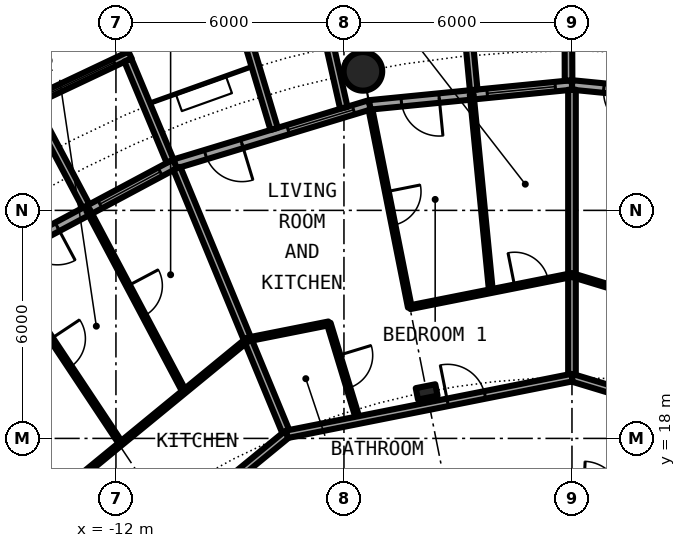
"""IFC4 building model, lengths in metres.
Left out: names, types, materials, properties, quantities, classifications, styles, units other than length and angle.
Written with IfcOpenShell. Run it as: python <this file> out.ifc"""

import sys

from ifc_helpers import new_model, si_unit, direction, frame, frame_2d, origin, origin_2d, place, context, subcontext, project, spatial, rectangle, circle, hollow_circle, i_section, extrude, element, fill, save


model = new_model("IFC4")
c1 = context("Model", 3, precision=1e-05, world=origin(), true_north=direction((0.0, 1.0)))
c2 = subcontext(c1, "Body", "Model", "MODEL_VIEW")
j1 = project(units=[si_unit("LENGTHUNIT", "METRE"), si_unit("PLANEANGLEUNIT", "RADIAN")], contexts=[c1])
p1 = place(None, origin())
s1 = spatial("IfcSite", under=j1, at=p1, CompositionType="ELEMENT")
p2 = place(p1, origin())
s2 = spatial("IfcBuilding", under=s1, at=p2, CompositionType="ELEMENT")
p3 = place(p2, frame((0.0, 0.0, 91.05)))
s3 = spatial("IfcBuildingStorey", under=s2, at=p3, CompositionType="ELEMENT", Elevation=91.05)
p4 = place(p3, frame((-5.501, 27.658, 0.0), z_axis=(0.0, 0.0, 1.0), x_axis=(1.0, 0.0, 0.0)))
e1 = element("IfcColumn", 1, at=p4, inside=s3, PredefinedType="COLUMN", context=c2, shape_type="SweptSolid", body=[
    extrude(hollow_circle(Radius=0.508, WallThickness=0.04, at=origin_2d()), origin(), (0.0, 0.0, 1.0), 3.05),
])
p5 = place(p3, frame((-3.824, 19.223, 0.0), z_axis=(0.0, 0.0, 1.0), x_axis=(-0.195090322016, 0.980785280403, 0.0)))
e2 = element("IfcColumn", 2, at=p5, inside=s3, PredefinedType="COLUMN", context=c2, shape_type="SweptSolid", body=[
    extrude(i_section(OverallWidth=0.306, OverallDepth=0.524, WebThickness=0.021, FlangeThickness=0.04, FilletRadius=0.027, at=origin_2d()), origin(), (0.0, 0.0, 1.0), 3.05),
])
p6 = place(p3, frame((5.326, 26.775, 0.0), z_axis=(0.0, 0.0, 1.0), x_axis=(-0.995173996315, 0.098126026407, 0.0)))
e3 = element("IfcWall", 3, at=p6, inside=s3, PredefinedType="SOLIDWALL", context=c2, shape_type="SweptSolid", body=[
    extrude(rectangle(XDim=5.352, YDim=0.25, at=frame_2d((2.676, 0.0))), origin(), (0.0, 0.0, 1.0), 2.7),
])
p7 = place(p6, frame((0.441, 0.0, 0.3)))
e4 = element("IfcOpeningElement", 4, at=p7, cuts=e3, PredefinedType="OPENING", context=c2, shape_type="SweptSolid", body=[
    extrude(rectangle(XDim=1.8, YDim=2.1, at=frame_2d((0.9, 1.05))), frame((0.0, 0.135, 0.0), z_axis=(0.0, -1.0, 0.0), x_axis=(1.0, 0.0, 0.0)), (0.0, 0.0, 1.0), 0.27),
])
p8 = place(p6, frame((3.51, 0.0, 0.0)))
e5 = element("IfcOpeningElement", 5, at=p8, cuts=e3, PredefinedType="OPENING", context=c2, shape_type="SweptSolid", body=[
    extrude(rectangle(XDim=1.0, YDim=2.2, at=frame_2d((0.5, 1.1))), frame((0.0, 0.135, 0.0), z_axis=(0.0, -1.0, 0.0), x_axis=(1.0, 0.0, 0.0)), (0.0, 0.0, 1.0), 0.27),
])
p9 = place(p3, frame((0.0, 27.3, 0.0), z_axis=(0.0, 0.0, 1.0), x_axis=(-0.995173996315, -0.098126026407, 0.0)))
e6 = element("IfcWall", 6, at=p9, inside=s3, PredefinedType="SOLIDWALL", context=c2, shape_type="SweptSolid", body=[
    extrude(rectangle(XDim=5.352, YDim=0.25, at=frame_2d((2.676, 0.0))), origin(), (0.0, 0.0, 1.0), 2.7),
])
p10 = place(p9, frame((0.441, 0.0, 0.3)))
e7 = element("IfcOpeningElement", 7, at=p10, cuts=e6, PredefinedType="OPENING", context=c2, shape_type="SweptSolid", body=[
    extrude(rectangle(XDim=1.8, YDim=2.1, at=frame_2d((0.9, 1.05))), frame((0.0, 0.135, 0.0), z_axis=(0.0, -1.0, 0.0), x_axis=(1.0, 0.0, 0.0)), (0.0, 0.0, 1.0), 0.27),
])
p11 = place(p9, frame((3.51, 0.0, 0.0)))
e8 = element("IfcOpeningElement", 8, at=p11, cuts=e6, PredefinedType="OPENING", context=c2, shape_type="SweptSolid", body=[
    extrude(rectangle(XDim=1.0, YDim=2.2, at=frame_2d((0.5, 1.1))), frame((0.0, 0.135, 0.0), z_axis=(0.0, -1.0, 0.0), x_axis=(1.0, 0.0, 0.0)), (0.0, 0.0, 1.0), 0.27),
])
p12 = place(p3, frame((-0.09, 27.417, -0.03), z_axis=(0.0, 0.0, 1.0), x_axis=(-0.00347308367, 0.999993968827, 0.0)))
e9 = element("IfcWall", 9, at=p12, inside=s3, PredefinedType="SOLIDWALL", context=c2, shape_type="SweptSolid", body=[
    extrude(rectangle(XDim=2.882, YDim=0.2, at=frame_2d((1.441, 0.0))), origin(), (0.0, 0.0, 1.0), 2.73),
])
p13 = place(p3, frame((-2.586, 27.171, -0.03), z_axis=(0.0, 0.0, 1.0), x_axis=(-0.094548432284, 0.995520262954, 0.0)))
e10 = element("IfcWall", 10, at=p13, inside=s3, PredefinedType="SOLIDWALL", context=c2, shape_type="SweptSolid", body=[
    extrude(rectangle(XDim=3.006, YDim=0.2, at=frame_2d((1.503, 0.0))), origin(), (0.0, 0.0, 1.0), 2.73),
])
p14 = place(p3, frame((-5.326, 26.775, 0.0), z_axis=(0.0, 0.0, 1.0), x_axis=(-0.956965678721, -0.290201119486, 0.0)))
e11 = element("IfcWall", 11, at=p14, inside=s3, PredefinedType="SOLIDWALL", context=c2, shape_type="SweptSolid", body=[
    extrude(rectangle(XDim=5.351, YDim=0.25, at=frame_2d((2.676, 0.0))), origin(), (0.0, 0.0, 1.0), 2.7),
])
p15 = place(p14, frame((0.441, 0.0, 0.3)))
e12 = element("IfcOpeningElement", 12, at=p15, cuts=e11, PredefinedType="OPENING", context=c2, shape_type="SweptSolid", body=[
    extrude(rectangle(XDim=1.8, YDim=2.1, at=frame_2d((0.9, 1.05))), frame((0.0, 0.135, 0.0), z_axis=(0.0, -1.0, 0.0), x_axis=(1.0, 0.0, 0.0)), (0.0, 0.0, 1.0), 0.27),
])
p16 = place(p14, frame((3.51, 0.0, 0.0)))
e13 = element("IfcOpeningElement", 13, at=p16, cuts=e11, PredefinedType="OPENING", context=c2, shape_type="SweptSolid", body=[
    extrude(rectangle(XDim=1.0, YDim=2.2, at=frame_2d((0.5, 1.1))), frame((0.0, 0.135, 0.0), z_axis=(0.0, -1.0, 0.0), x_axis=(1.0, 0.0, 0.0)), (0.0, 0.0, 1.0), 0.27),
])
p17 = place(p3, frame((-6.004, 26.7, -0.03), z_axis=(0.0, 0.0, 1.0), x_axis=(-0.219609259383, 0.975587911566, 0.0)))
e14 = element("IfcWall", 14, at=p17, inside=s3, PredefinedType="SOLIDWALL", context=c2, shape_type="SweptSolid", body=[
    extrude(rectangle(XDim=2.933, YDim=0.2, at=frame_2d((1.466, 0.0))), origin(), (0.0, 0.0, 1.0), 2.73),
])
p18 = place(p3, frame((-7.837, 26.144, -0.03), z_axis=(0.0, 0.0, 1.0), x_axis=(-0.287064767992, 0.957911174889, 0.0)))
e15 = element("IfcWall", 15, at=p18, inside=s3, PredefinedType="SOLIDWALL", context=c2, shape_type="SweptSolid", body=[
    extrude(rectangle(XDim=3.006, YDim=0.2, at=frame_2d((1.503, 0.0))), origin(), (0.0, 0.0, 1.0), 2.73),
])
p19 = place(p3, frame((-10.447, 25.222, 0.0), z_axis=(0.0, 0.0, 1.0), x_axis=(-0.881915646801, -0.471407246368, 0.0)))
e16 = element("IfcWall", 16, at=p19, inside=s3, PredefinedType="SOLIDWALL", context=c2, shape_type="SweptSolid", body=[
    extrude(rectangle(XDim=5.352, YDim=0.25, at=frame_2d((2.676, 0.0))), origin(), (0.0, 0.0, 1.0), 2.7),
])
p20 = place(p19, frame((0.441, 0.0, 0.3)))
e17 = element("IfcOpeningElement", 17, at=p20, cuts=e16, PredefinedType="OPENING", context=c2, shape_type="SweptSolid", body=[
    extrude(rectangle(XDim=1.8, YDim=2.1, at=frame_2d((0.9, 1.05))), frame((0.0, 0.135, 0.0), z_axis=(0.0, -1.0, 0.0), x_axis=(1.0, 0.0, 0.0)), (0.0, 0.0, 1.0), 0.27),
])
p21 = place(p19, frame((3.51, 0.0, 0.0)))
e18 = element("IfcOpeningElement", 18, at=p21, cuts=e16, PredefinedType="OPENING", context=c2, shape_type="SweptSolid", body=[
    extrude(rectangle(XDim=1.0, YDim=2.2, at=frame_2d((0.5, 1.1))), frame((0.0, 0.135, 0.0), z_axis=(0.0, -1.0, 0.0), x_axis=(1.0, 0.0, 0.0)), (0.0, 0.0, 1.0), 0.27),
])
p22 = place(p3, frame((-11.629, 28.088, -0.03), z_axis=(0.0, 0.0, 1.0), x_axis=(-0.904000060331, -0.427532327342, 0.0)))
e19 = element("IfcWall", 19, at=p22, inside=s3, PredefinedType="SOLIDWALL", context=c2, shape_type="SweptSolid", body=[
    extrude(rectangle(XDim=2.993, YDim=0.2, at=frame_2d((1.497, 0.0))), origin(), (0.0, 0.0, 1.0), 2.73),
])
p23 = place(p22, frame((0.457, 0.0, 0.33)))
e20 = element("IfcOpeningElement", 20, at=p23, cuts=e19, PredefinedType="OPENING", context=c2, shape_type="SweptSolid", body=[
    extrude(circle(Radius=1.04, at=frame_2d((1.04, 1.04))), frame((0.0, 0.11, 0.0), z_axis=(0.0, -1.0, 0.0), x_axis=(1.0, 0.0, 0.0)), (0.0, 0.0, 1.0), 0.22),
])
p24 = place(p3, frame((-10.575, 25.295, -0.03), z_axis=(0.0, 0.0, 1.0), x_axis=(-0.385697364644, 0.922625353492, 0.0)))
e21 = element("IfcWall", 21, at=p24, inside=s3, PredefinedType="SOLIDWALL", context=c2, shape_type="SweptSolid", body=[
    extrude(rectangle(XDim=2.883, YDim=0.2, at=frame_2d((1.442, 0.0))), origin(), (0.0, 0.0, 1.0), 2.73),
])
p25 = place(p3, frame((-12.787, 24.113, -0.03), z_axis=(0.0, 0.0, 1.0), x_axis=(-0.468365282436, 0.883534924159, 0.0)))
e22 = element("IfcWall", 22, at=p25, inside=s3, PredefinedType="SOLIDWALL", context=c2, shape_type="SweptSolid", body=[
    extrude(rectangle(XDim=3.006, YDim=0.2, at=frame_2d((1.503, 0.0))), origin(), (0.0, 0.0, 1.0), 2.73),
])
p26 = place(p3, frame((-17.24, 21.007, 0.0), z_axis=(0.0, 0.0, 1.0), x_axis=(0.634396151441, -0.77300810024, 0.0)))
e23 = element("IfcWall", 23, at=p26, inside=s3, PredefinedType="PARTITIONING", context=c2, shape_type="SweptSolid", body=[
    extrude(rectangle(XDim=8.419, YDim=0.1, at=frame_2d((4.209, 0.0))), origin(), (0.0, 0.0, 1.0), 2.7),
])
p27 = place(p26, frame((6.679, 0.0, 0.0)))
e24 = element("IfcOpeningElement", 24, at=p27, cuts=e23, PredefinedType="OPENING", context=c2, shape_type="SweptSolid", body=[
    extrude(rectangle(XDim=0.9, YDim=2.3, at=frame_2d((0.45, 1.15))), frame((0.0, 0.06, 0.0), z_axis=(0.0, -1.0, 0.0), x_axis=(1.0, 0.0, 0.0)), (0.0, 0.0, 1.0), 0.12),
])
p28 = place(p26, frame((2.468, 0.0, 0.0)))
e25 = element("IfcOpeningElement", 25, at=p28, cuts=e23, PredefinedType="OPENING", context=c2, shape_type="SweptSolid", body=[
    extrude(rectangle(XDim=0.9, YDim=2.3, at=frame_2d((0.45, 1.15))), frame((0.0, 0.06, 0.0), z_axis=(0.0, -1.0, 0.0), x_axis=(1.0, 0.0, 0.0)), (0.0, 0.0, 1.0), 0.12),
])
p29 = place(p3, frame((-15.039, 22.634, 0.0), z_axis=(0.0, 0.0, 1.0), x_axis=(0.553440102418, -0.832888980018, 0.0)))
e26 = element("IfcWall", 26, at=p29, inside=s3, PredefinedType="PARTITIONING", context=c2, shape_type="SweptSolid", body=[
    extrude(rectangle(XDim=5.726, YDim=0.1, at=frame_2d((2.863, 0.0))), origin(), (0.0, 0.0, 1.0), 2.7),
])
p30 = place(p29, frame((2.413, 0.0, 0.0)))
e27 = element("IfcOpeningElement", 27, at=p30, cuts=e26, PredefinedType="OPENING", context=c2, shape_type="SweptSolid", body=[
    extrude(rectangle(XDim=0.9, YDim=2.3, at=frame_2d((0.45, 1.15))), frame((0.0, 0.06, 0.0), z_axis=(0.0, -1.0, 0.0), x_axis=(1.0, 0.0, 0.0)), (0.0, 0.0, 1.0), 0.12),
])
p31 = place(p3, frame((-12.734, 24.007, 0.0), z_axis=(0.0, 0.0, 1.0), x_axis=(0.468610030042, -0.883405139075, 0.0)))
e28 = element("IfcWall", 28, at=p31, inside=s3, PredefinedType="PARTITIONING", context=c2, shape_type="SweptSolid", body=[
    extrude(rectangle(XDim=5.403, YDim=0.1, at=frame_2d((2.702, 0.0))), origin(), (0.0, 0.0, 1.0), 2.7),
])
p32 = place(p31, frame((2.252, 0.0, 0.0)))
e29 = element("IfcOpeningElement", 29, at=p32, cuts=e28, PredefinedType="OPENING", context=c2, shape_type="SweptSolid", body=[
    extrude(rectangle(XDim=0.9, YDim=2.3, at=frame_2d((0.45, 1.15))), frame((0.0, 0.06, 0.0), z_axis=(0.0, -1.0, 0.0), x_axis=(1.0, 0.0, 0.0)), (0.0, 0.0, 1.0), 0.12),
])
p33 = place(p3, frame((-10.398, 25.106, 0.0), z_axis=(0.0, 0.0, 1.0), x_axis=(0.382490346157, -0.923959487801, 0.0)))
e30 = element("IfcWall", 30, at=p33, inside=s3, PredefinedType="PARTITIONING", context=c2, shape_type="SweptSolid", body=[
    extrude(rectangle(XDim=7.574, YDim=0.2, at=frame_2d((3.787, 0.0))), origin(), (0.0, 0.0, 1.0), 2.7),
])
p34 = place(p3, frame((-6.4, 21.027, 0.0), z_axis=(0.0, 0.0, 1.0), x_axis=(0.291157965538, -0.956674991365, 0.0)))
e31 = element("IfcWall", 31, at=p34, inside=s3, PredefinedType="PARTITIONING", context=c2, shape_type="SweptSolid", body=[
    extrude(rectangle(XDim=2.661, YDim=0.1, at=frame_2d((1.331, 0.0))), origin(), (0.0, 0.0, 1.0), 2.7),
])
p35 = place(p34, frame((0.881, 0.0, 0.0)))
e32 = element("IfcOpeningElement", 32, at=p35, cuts=e31, PredefinedType="OPENING", context=c2, shape_type="SweptSolid", body=[
    extrude(rectangle(XDim=0.9, YDim=2.3, at=frame_2d((0.45, 1.15))), frame((0.0, 0.06, 0.0), z_axis=(0.0, -1.0, 0.0), x_axis=(1.0, 0.0, 0.0)), (0.0, 0.0, 1.0), 0.12),
])
p36 = place(p3, frame((-5.302, 26.653, 0.0), z_axis=(0.0, 0.0, 1.0), x_axis=(0.195115793364, -0.980780213493, 0.0)))
e33 = element("IfcWall", 33, at=p36, inside=s3, PredefinedType="PARTITIONING", context=c2, shape_type="SweptSolid", body=[
    extrude(rectangle(XDim=5.304, YDim=0.1, at=frame_2d((2.652, 0.0))), origin(), (0.0, 0.0, 1.0), 2.7),
])
p37 = place(p36, frame((2.202, 0.0, 0.0)))
e34 = element("IfcOpeningElement", 34, at=p37, cuts=e33, PredefinedType="OPENING", context=c2, shape_type="SweptSolid", body=[
    extrude(rectangle(XDim=0.9, YDim=2.3, at=frame_2d((0.45, 1.15))), frame((0.0, 0.06, 0.0), z_axis=(0.0, -1.0, 0.0), x_axis=(1.0, 0.0, 0.0)), (0.0, 0.0, 1.0), 0.12),
])
p38 = place(p3, frame((-2.638, 27.047, 0.0), z_axis=(0.0, 0.0, 1.0), x_axis=(0.097172620677, -0.99526754282, 0.0)))
e35 = element("IfcWall", 35, at=p38, inside=s3, PredefinedType="PARTITIONING", context=c2, shape_type="SweptSolid", body=[
    extrude(rectangle(XDim=5.196, YDim=0.1, at=frame_2d((2.598, 0.0))), origin(), (0.0, 0.0, 1.0), 2.7),
])
p39 = place(p3, frame((0.0, 19.6, 0.0), z_axis=(0.0, 0.0, 1.0), x_axis=(0.0, 1.0, 0.0)))
e36 = element("IfcWall", 36, at=p39, inside=s3, PredefinedType="PARTITIONING", context=c2, shape_type="SweptSolid", body=[
    extrude(rectangle(XDim=7.575, YDim=0.2, at=frame_2d((3.788, 0.0))), origin(), (0.0, 0.0, 1.0), 2.7),
])
p40 = place(p3, frame((-0.007, 19.599, 0.0), z_axis=(0.0, 0.0, 1.0), x_axis=(0.95700958731, -0.290056287291, 0.0)))
e37 = element("IfcWall", 37, at=p40, inside=s3, PredefinedType="PARTITIONING", context=c2, shape_type="SweptSolid", body=[
    extrude(rectangle(XDim=11.226, YDim=0.2, at=frame_2d((5.613, 0.0))), origin(), (0.0, 0.0, 1.0), 2.38),
])
p41 = place(p40, frame((7.093, 0.0, 0.0)))
e38 = element("IfcOpeningElement", 38, at=p41, cuts=e37, PredefinedType="OPENING", context=c2, shape_type="SweptSolid", body=[
    extrude(rectangle(XDim=1.0, YDim=2.3, at=frame_2d((0.5, 1.15))), frame((0.0, 0.11, 0.0), z_axis=(0.0, -1.0, 0.0), x_axis=(1.0, 0.0, 0.0)), (0.0, 0.0, 1.0), 0.22),
])
p42 = place(p3, frame((-16.173, 10.991, 0.0), z_axis=(0.0, 0.0, 1.0), x_axis=(0.773049018445, 0.634346289562, 0.0)))
e39 = element("IfcWall", 39, at=p42, inside=s3, PredefinedType="PARTITIONING", context=c2, shape_type="SweptSolid", body=[
    extrude(rectangle(XDim=11.219, YDim=0.2, at=frame_2d((5.61, 0.0))), origin(), (0.0, 0.0, 1.0), 2.38),
])
p43 = place(p42, frame((3.135, 0.0, 0.0)))
e40 = element("IfcOpeningElement", 40, at=p43, cuts=e39, PredefinedType="OPENING", context=c2, shape_type="SweptSolid", body=[
    extrude(rectangle(XDim=1.0, YDim=2.3, at=frame_2d((0.5, 1.15))), frame((0.0, 0.11, 0.0), z_axis=(0.0, -1.0, 0.0), x_axis=(1.0, 0.0, 0.0)), (0.0, 0.0, 1.0), 0.22),
])
p44 = place(p3, frame((-7.501, 18.108, 0.0), z_axis=(0.0, 0.0, 1.0), x_axis=(0.980791233058, 0.195060393611, 0.0)))
e41 = element("IfcWall", 41, at=p44, inside=s3, PredefinedType="PARTITIONING", context=c2, shape_type="SweptSolid", body=[
    extrude(rectangle(XDim=7.65, YDim=0.2, at=frame_2d((3.825, 0.0))), origin(), (0.0, 0.0, 1.0), 2.38),
])
p45 = place(p44, frame((4.313, 0.0, 0.0)))
e42 = element("IfcOpeningElement", 42, at=p45, cuts=e41, PredefinedType="OPENING", context=c2, shape_type="SweptSolid", body=[
    extrude(rectangle(XDim=1.0, YDim=2.3, at=frame_2d((0.5, 1.15))), frame((0.0, 0.11, 0.0), z_axis=(0.0, -1.0, 0.0), x_axis=(1.0, 0.0, 0.0)), (0.0, 0.0, 1.0), 0.22),
])
p46 = place(p3, frame((-13.538, 16.496, 0.0), z_axis=(0.0, 0.0, 1.0), x_axis=(0.773000340237, 0.634405606843, 0.0)))
e43 = element("IfcWall", 43, at=p46, inside=s3, PredefinedType="PARTITIONING", context=c2, shape_type="SweptSolid", body=[
    extrude(rectangle(XDim=6.474, YDim=0.1, at=frame_2d((3.237, 0.0))), origin(), (0.0, 0.0, 1.0), 2.7),
])
p47 = place(p3, frame((-0.004, 22.299, 0.0), z_axis=(0.0, 0.0, 1.0), x_axis=(0.95699555343, -0.290102586537, 0.0)))
e44 = element("IfcWall", 44, at=p47, inside=s3, PredefinedType="PARTITIONING", context=c2, shape_type="SweptSolid", body=[
    extrude(rectangle(XDim=6.478, YDim=0.1, at=frame_2d((3.239, 0.0))), origin(), (0.0, 0.0, 1.0), 2.7),
])
p48 = place(p3, frame((-8.534, 20.603, 0.0), z_axis=(0.0, 0.0, 1.0), x_axis=(0.980821612706, 0.194907578226, 0.0)))
e45 = element("IfcWall", 45, at=p48, inside=s3, PredefinedType="PARTITIONING", context=c2, shape_type="SweptSolid", body=[
    extrude(rectangle(XDim=2.176, YDim=0.1, at=frame_2d((1.088, 0.0))), origin(), (0.0, 0.0, 1.0), 2.7),
])
p49 = place(p3, frame((-4.261, 21.452, 0.0), z_axis=(0.0, 0.0, 1.0), x_axis=(0.980819753929, 0.194916931799, 0.0)))
e46 = element("IfcWall", 46, at=p49, inside=s3, PredefinedType="PARTITIONING", context=c2, shape_type="SweptSolid", body=[
    extrude(rectangle(XDim=4.346, YDim=0.1, at=frame_2d((2.173, 0.0))), origin(), (0.0, 0.0, 1.0), 2.7),
])
p50 = place(p49, frame((2.807, 0.0, 0.0)))
e47 = element("IfcOpeningElement", 47, at=p50, cuts=e46, PredefinedType="OPENING", context=c2, shape_type="SweptSolid", body=[
    extrude(rectangle(XDim=0.9, YDim=2.3, at=frame_2d((0.45, 1.15))), frame((0.0, 0.06, 0.0), z_axis=(0.0, -1.0, 0.0), x_axis=(1.0, 0.0, 0.0)), (0.0, 0.0, 1.0), 0.12),
])
p51 = place(p8, origin())
e48 = element("IfcDoor", 48, at=p51, inside=s3, OperationType="SINGLE_SWING_LEFT", PredefinedType="DOOR", context=c2, shape_type="SweptSolid", body=[
    extrude(rectangle(XDim=1.0, YDim=2.2, at=frame_2d((0.5, 1.1))), frame((0.0, 0.025, 0.0), z_axis=(0.0, -1.0, 0.0), x_axis=(1.0, 0.0, 0.0)), (0.0, 0.0, 1.0), 0.05),
])
fill(e5, e48)
p52 = place(p10, origin())
e49 = element("IfcWindow", 49, at=p52, inside=s3, PartitioningType="SINGLE_PANEL", PredefinedType="WINDOW", context=c2, shape_type="SweptSolid", body=[
    extrude(rectangle(XDim=1.8, YDim=2.1, at=frame_2d((0.9, 1.05))), frame((0.0, 0.03, 0.0), z_axis=(0.0, -1.0, 0.0), x_axis=(1.0, 0.0, 0.0)), (0.0, 0.0, 1.0), 0.06),
])
fill(e7, e49)
p53 = place(p11, origin())
e50 = element("IfcDoor", 50, at=p53, inside=s3, OperationType="SINGLE_SWING_LEFT", PredefinedType="DOOR", context=c2, shape_type="SweptSolid", body=[
    extrude(rectangle(XDim=1.0, YDim=2.2, at=frame_2d((0.5, 1.1))), frame((0.0, 0.025, 0.0), z_axis=(0.0, -1.0, 0.0), x_axis=(1.0, 0.0, 0.0)), (0.0, 0.0, 1.0), 0.05),
])
fill(e8, e50)
p54 = place(p15, origin())
e51 = element("IfcWindow", 51, at=p54, inside=s3, PartitioningType="SINGLE_PANEL", PredefinedType="WINDOW", context=c2, shape_type="SweptSolid", body=[
    extrude(rectangle(XDim=1.8, YDim=2.1, at=frame_2d((0.9, 1.05))), frame((0.0, 0.03, 0.0), z_axis=(0.0, -1.0, 0.0), x_axis=(1.0, 0.0, 0.0)), (0.0, 0.0, 1.0), 0.06),
])
fill(e12, e51)
p55 = place(p16, origin())
e52 = element("IfcDoor", 52, at=p55, inside=s3, OperationType="SINGLE_SWING_LEFT", PredefinedType="DOOR", context=c2, shape_type="SweptSolid", body=[
    extrude(rectangle(XDim=1.0, YDim=2.2, at=frame_2d((0.5, 1.1))), frame((0.0, 0.025, 0.0), z_axis=(0.0, -1.0, 0.0), x_axis=(1.0, 0.0, 0.0)), (0.0, 0.0, 1.0), 0.05),
])
fill(e13, e52)
p56 = place(p20, origin())
e53 = element("IfcWindow", 53, at=p56, inside=s3, PartitioningType="SINGLE_PANEL", PredefinedType="WINDOW", context=c2, shape_type="SweptSolid", body=[
    extrude(rectangle(XDim=1.8, YDim=2.1, at=frame_2d((0.9, 1.05))), frame((0.0, 0.03, 0.0), z_axis=(0.0, -1.0, 0.0), x_axis=(1.0, 0.0, 0.0)), (0.0, 0.0, 1.0), 0.06),
])
fill(e17, e53)
p57 = place(p23, origin())
e54 = element("IfcWindow", 54, at=p57, inside=s3, PartitioningType="SINGLE_PANEL", PredefinedType="WINDOW", context=c2, shape_type="SweptSolid", body=[
    extrude(circle(Radius=1.04, at=frame_2d((1.04, 1.04))), frame((0.0, 0.03, 0.0), z_axis=(0.0, -1.0, 0.0), x_axis=(1.0, 0.0, 0.0)), (0.0, 0.0, 1.0), 0.06),
])
fill(e20, e54)
p58 = place(p21, origin())
e55 = element("IfcDoor", 55, at=p58, inside=s3, OperationType="SINGLE_SWING_LEFT", PredefinedType="DOOR", context=c2, shape_type="SweptSolid", body=[
    extrude(rectangle(XDim=1.0, YDim=2.2, at=frame_2d((0.5, 1.1))), frame((0.0, 0.025, 0.0), z_axis=(0.0, -1.0, 0.0), x_axis=(1.0, 0.0, 0.0)), (0.0, 0.0, 1.0), 0.05),
])
fill(e18, e55)
p59 = place(p45, origin())
e56 = element("IfcDoor", 56, at=p59, inside=s3, OperationType="SINGLE_SWING_RIGHT", PredefinedType="DOOR", context=c2, shape_type="SweptSolid", body=[
    extrude(rectangle(XDim=1.0, YDim=2.3, at=frame_2d((0.5, 1.15))), frame((0.0, 0.025, 0.0), z_axis=(0.0, -1.0, 0.0), x_axis=(1.0, 0.0, 0.0)), (0.0, 0.0, 1.0), 0.05),
])
fill(e42, e56)
p60 = place(p35, origin())
e57 = element("IfcDoor", 57, at=p60, inside=s3, OperationType="SINGLE_SWING_RIGHT", PredefinedType="DOOR", context=c2, shape_type="SweptSolid", body=[
    extrude(rectangle(XDim=0.9, YDim=2.3, at=frame_2d((0.45, 1.15))), frame((0.0, 0.025, 0.0), z_axis=(0.0, -1.0, 0.0), x_axis=(1.0, 0.0, 0.0)), (0.0, 0.0, 1.0), 0.05),
])
fill(e32, e57)
p61 = place(p37, origin())
e58 = element("IfcDoor", 58, at=p61, inside=s3, OperationType="SINGLE_SWING_LEFT", PredefinedType="DOOR", context=c2, shape_type="SweptSolid", body=[
    extrude(rectangle(XDim=0.9, YDim=2.3, at=frame_2d((0.45, 1.15))), frame((0.0, 0.025, 0.0), z_axis=(0.0, -1.0, 0.0), x_axis=(1.0, 0.0, 0.0)), (0.0, 0.0, 1.0), 0.05),
])
fill(e34, e58)
p62 = place(p50, origin())
e59 = element("IfcDoor", 59, at=p62, inside=s3, OperationType="SINGLE_SWING_RIGHT", PredefinedType="DOOR", context=c2, shape_type="SweptSolid", body=[
    extrude(rectangle(XDim=0.9, YDim=2.3, at=frame_2d((0.45, 1.15))), frame((0.0, 0.025, 0.0), z_axis=(0.0, -1.0, 0.0), x_axis=(1.0, 0.0, 0.0)), (0.0, 0.0, 1.0), 0.05),
])
fill(e47, e59)
p63 = place(p30, origin())
e60 = element("IfcDoor", 60, at=p63, inside=s3, OperationType="SINGLE_SWING_RIGHT", PredefinedType="DOOR", context=c2, shape_type="SweptSolid", body=[
    extrude(rectangle(XDim=0.9, YDim=2.3, at=frame_2d((0.45, 1.15))), frame((0.0, 0.025, 0.0), z_axis=(0.0, -1.0, 0.0), x_axis=(1.0, 0.0, 0.0)), (0.0, 0.0, 1.0), 0.05),
])
fill(e27, e60)
p64 = place(p32, origin())
e61 = element("IfcDoor", 61, at=p64, inside=s3, OperationType="SINGLE_SWING_LEFT", PredefinedType="DOOR", context=c2, shape_type="SweptSolid", body=[
    extrude(rectangle(XDim=0.9, YDim=2.3, at=frame_2d((0.45, 1.15))), frame((0.0, 0.025, 0.0), z_axis=(0.0, -1.0, 0.0), x_axis=(1.0, 0.0, 0.0)), (0.0, 0.0, 1.0), 0.05),
])
fill(e29, e61)
save(model, sys.argv[1])
